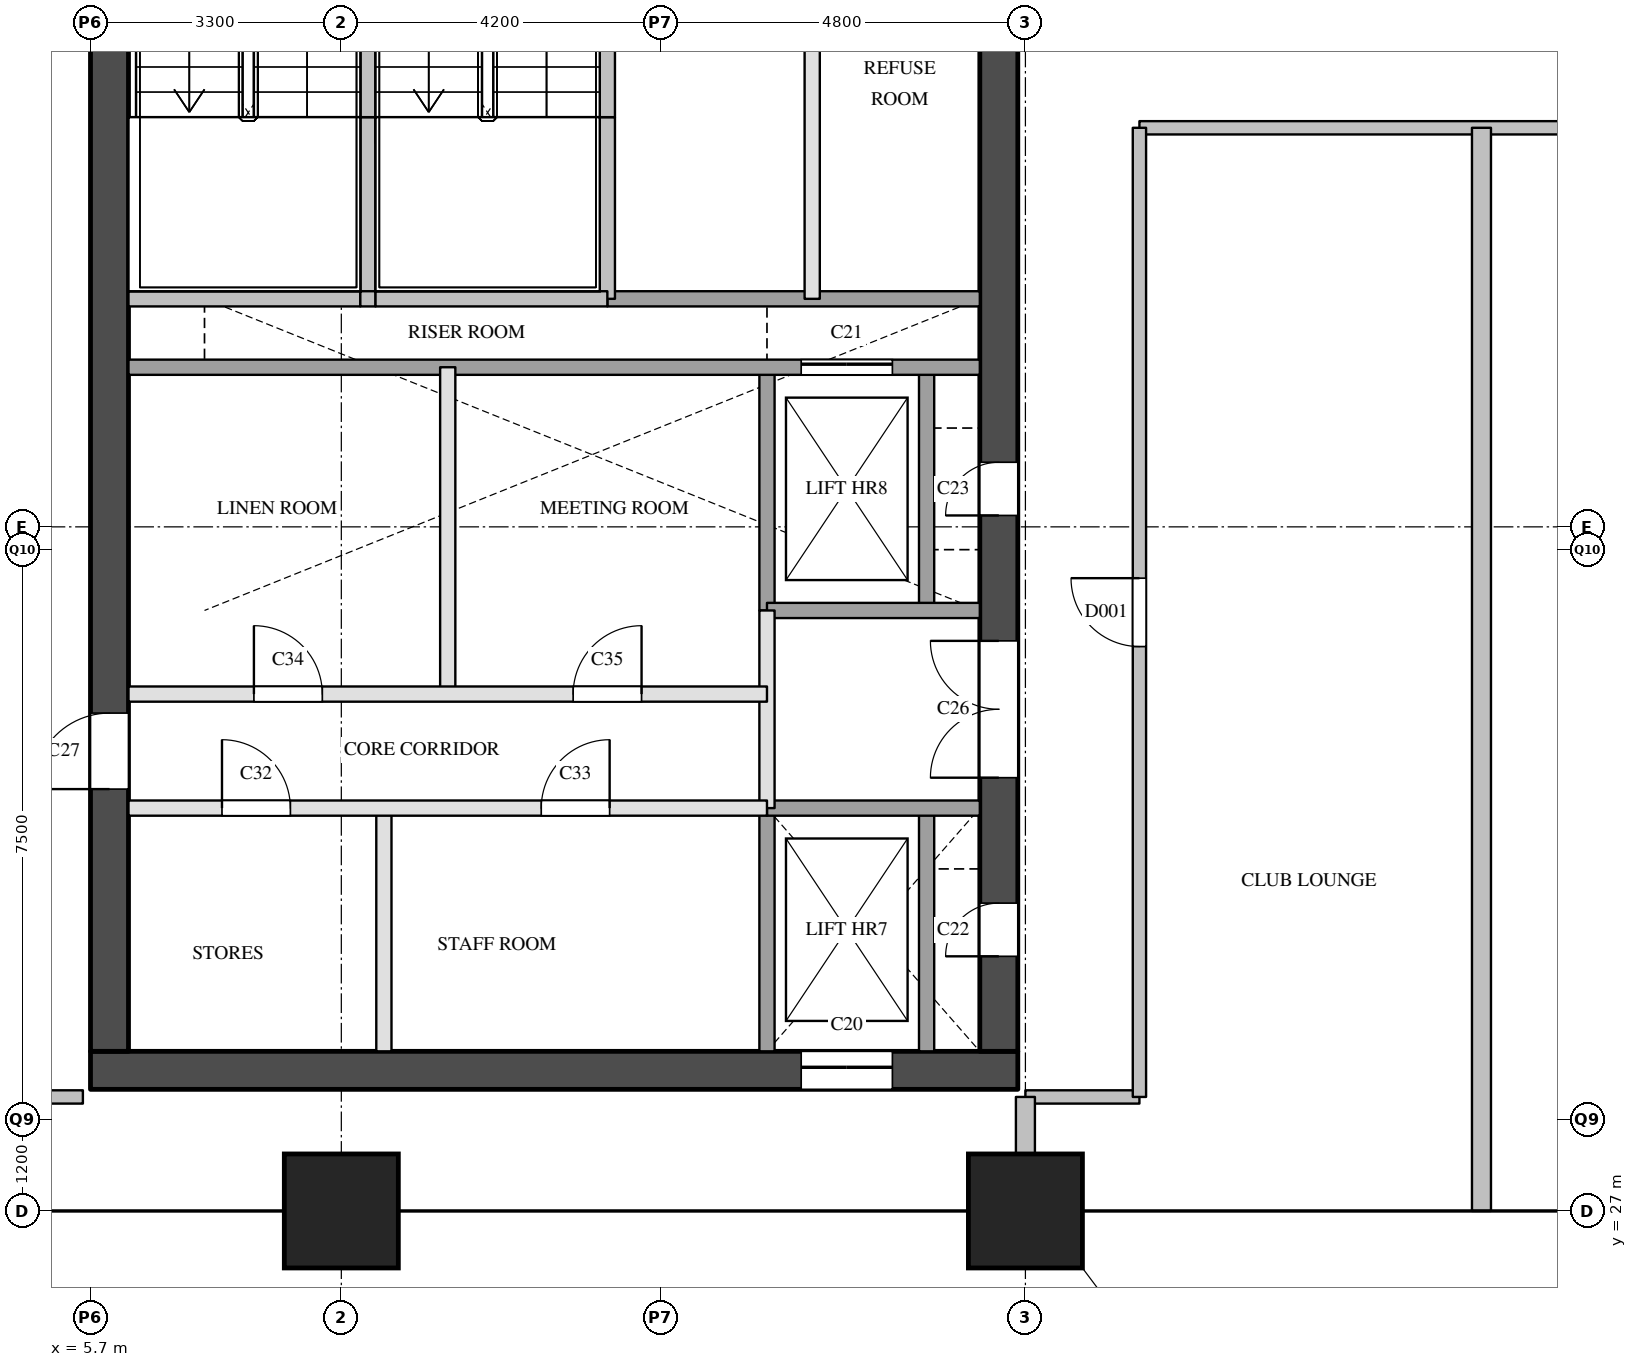
"""IFC4 building model, lengths in metres.
Left out: names, types, materials, properties, quantities, classifications, styles, units other than length and angle.
Written with IfcOpenShell. Run it as: python <this file> out.ifc"""

import sys

from ifc_helpers import new_model, si_unit, direction, frame, frame_2d, origin, origin_2d, place, context, subcontext, project, spatial, rectangle, extrude, element, fill, save


model = new_model("IFC4")
c1 = context("Model", 3, precision=1e-05, world=origin(), true_north=direction((0.0, 1.0)))
c2 = subcontext(c1, "Body", "Model", "MODEL_VIEW")
j1 = project(units=[si_unit("LENGTHUNIT", "METRE"), si_unit("PLANEANGLEUNIT", "RADIAN")], contexts=[c1])
p1 = place(None, origin())
s1 = spatial("IfcSite", under=j1, at=p1, CompositionType="ELEMENT")
p2 = place(p1, origin())
s2 = spatial("IfcBuilding", under=s1, at=p2, CompositionType="ELEMENT")
p3 = place(p2, frame((0.0, 0.0, 129.4)))
s3 = spatial("IfcBuildingStorey", under=s2, at=p3, CompositionType="ELEMENT", Elevation=129.4)
for number, where, z_axis, x_axis in (
    (1, (9.0, 27.0, 0.0), (0.0, 0.0, 1.0), (1.0, 0.0, 0.0)),
    (2, (18.0, 27.0, 0.0), (0.0, 0.0, 1.0), (1.0, 0.0, 0.0)),
):
    element("IfcColumn", number, at=place(p3, frame(where, z_axis=z_axis, x_axis=x_axis)), inside=s3, PredefinedType="COLUMN", context=c2, shape_type="SweptSolid", body=[
        extrude(rectangle(XDim=1.5, YDim=1.5, at=origin_2d()), origin(), (0.0, 0.0, 1.0), 5.5),
    ])
p4 = place(p3, frame((5.7, 28.85, 0.0), z_axis=(0.0, 0.0, 1.0), x_axis=(1.0, 0.0, 0.0)))
e3 = element("IfcWall", 3, at=p4, inside=s3, PredefinedType="SHEAR", context=c2, shape_type="SweptSolid", body=[
    extrude(rectangle(XDim=12.2, YDim=0.5, at=frame_2d((6.1, 0.0))), origin(), (0.0, 0.0, 1.0), 5.2),
])
p5 = place(p4, frame((9.35, 0.0, 0.0)))
e4 = element("IfcOpeningElement", 4, at=p5, cuts=e3, PredefinedType="OPENING", context=c2, shape_type="SweptSolid", body=[
    extrude(rectangle(XDim=1.2, YDim=2.1, at=frame_2d((0.6, 1.05))), frame((0.0, 0.26, 0.0), z_axis=(0.0, -1.0, 0.0), x_axis=(1.0, 0.0, 0.0)), (0.0, 0.0, 1.0), 0.52),
])
p6 = place(p3, frame((5.95, 29.1, 0.0), z_axis=(0.0, 0.0, 1.0), x_axis=(0.0, 1.0, 0.0)))
e5 = element("IfcWall", 5, at=p6, inside=s3, PredefinedType="SHEAR", context=c2, shape_type="SweptSolid", body=[
    extrude(rectangle(XDim=20.3, YDim=0.5, at=frame_2d((10.15, 0.0))), origin(), (0.0, 0.0, 1.0), 5.2),
])
p7 = place(p6, frame((3.45, 0.0, 0.0)))
e6 = element("IfcOpeningElement", 6, at=p7, cuts=e5, PredefinedType="OPENING", context=c2, shape_type="SweptSolid", body=[
    extrude(rectangle(XDim=1.0, YDim=2.1, at=frame_2d((0.5, 1.05))), frame((0.0, 0.26, 0.0), z_axis=(0.0, -1.0, 0.0), x_axis=(1.0, 0.0, 0.0)), (0.0, 0.0, 1.0), 0.52),
])
p8 = place(p6, frame((16.4, 0.0, 0.0)))
e7 = element("IfcOpeningElement", 7, at=p8, cuts=e5, PredefinedType="OPENING", context=c2, shape_type="SweptSolid", body=[
    extrude(rectangle(XDim=1.0, YDim=2.1, at=frame_2d((0.5, 1.05))), frame((0.0, 0.26, 0.0), z_axis=(0.0, -1.0, 0.0), x_axis=(1.0, 0.0, 0.0)), (0.0, 0.0, 1.0), 0.52),
])
p9 = place(p3, frame((17.65, 29.1, 0.0), z_axis=(0.0, 0.0, 1.0), x_axis=(0.0, 1.0, 0.0)))
e8 = element("IfcWall", 8, at=p9, inside=s3, PredefinedType="SHEAR", context=c2, shape_type="SweptSolid", body=[
    extrude(rectangle(XDim=20.3, YDim=0.5, at=frame_2d((10.15, 0.0))), origin(), (0.0, 0.0, 1.0), 5.2),
])
p10 = place(p9, frame((1.25, 0.0, 0.0)))
e9 = element("IfcOpeningElement", 9, at=p10, cuts=e8, PredefinedType="OPENING", context=c2, shape_type="SweptSolid", body=[
    extrude(rectangle(XDim=0.7, YDim=2.1, at=frame_2d((0.35, 1.05))), frame((0.0, 0.26, 0.0), z_axis=(0.0, -1.0, 0.0), x_axis=(1.0, 0.0, 0.0)), (0.0, 0.0, 1.0), 0.52),
])
p11 = place(p9, frame((7.05, 0.0, 0.0)))
e10 = element("IfcOpeningElement", 10, at=p11, cuts=e8, PredefinedType="OPENING", context=c2, shape_type="SweptSolid", body=[
    extrude(rectangle(XDim=0.7, YDim=2.1, at=frame_2d((0.35, 1.05))), frame((0.0, 0.26, 0.0), z_axis=(0.0, -1.0, 0.0), x_axis=(1.0, 0.0, 0.0)), (0.0, 0.0, 1.0), 0.52),
])
p12 = place(p9, frame((3.6, 0.0, 0.0)))
e11 = element("IfcOpeningElement", 11, at=p12, cuts=e8, PredefinedType="OPENING", context=c2, shape_type="SweptSolid", body=[
    extrude(rectangle(XDim=1.8, YDim=2.1, at=frame_2d((0.9, 1.05))), frame((0.0, 0.26, 0.0), z_axis=(0.0, -1.0, 0.0), x_axis=(1.0, 0.0, 0.0)), (0.0, 0.0, 1.0), 0.52),
])
p13 = place(p3, frame((9.35, 39.0, 0.0), z_axis=(0.0, 0.0, 1.0), x_axis=(0.0, 1.0, 0.0)))
e12 = element("IfcWall", 12, at=p13, inside=s3, PredefinedType="SOLIDWALL", context=c2, shape_type="SweptSolid", body=[
    extrude(rectangle(XDim=2.39, YDim=0.2, at=frame_2d((1.195, 0.0))), origin(), (0.0, 0.0, 1.0), 5.2),
])
p14 = place(p3, frame((9.35, 41.39, 0.0), z_axis=(0.0, 0.0, 1.0), x_axis=(0.0, 1.0, 0.0)))
e13 = element("IfcWall", 13, at=p14, inside=s3, PredefinedType="SOLIDWALL", context=c2, shape_type="SweptSolid", body=[
    extrude(rectangle(XDim=2.31, YDim=0.2, at=frame_2d((1.155, 0.0))), origin(), (0.0, 0.0, 1.0), 5.2),
])
p15 = place(p3, frame((9.56, 29.1, 0.0), z_axis=(0.0, 0.0, 1.0), x_axis=(0.0, 1.0, 0.0)))
e14 = element("IfcWall", 14, at=p15, inside=s3, PredefinedType="PARTITIONING", context=c2, shape_type="SweptSolid", body=[
    extrude(rectangle(XDim=3.2, YDim=0.2, at=frame_2d((1.6, 0.0))), origin(), (0.0, 0.0, 1.0), 5.2),
])
p16 = place(p3, frame((10.4, 33.8, 0.0), z_axis=(0.0, 0.0, 1.0), x_axis=(0.0, 1.0, 0.0)))
e15 = element("IfcWall", 15, at=p16, inside=s3, PredefinedType="PARTITIONING", context=c2, shape_type="SweptSolid", body=[
    extrude(rectangle(XDim=4.3, YDim=0.2, at=frame_2d((2.15, 0.0))), origin(), (0.0, 0.0, 1.0), 5.2),
])
p17 = place(p3, frame((12.5, 39.0, 0.0), z_axis=(0.0, 0.0, 1.0), x_axis=(0.0, 1.0, 0.0)))
e16 = element("IfcWall", 16, at=p17, inside=s3, PredefinedType="SOLIDWALL", context=c2, shape_type="SweptSolid", body=[
    extrude(rectangle(XDim=2.39, YDim=0.2, at=frame_2d((1.195, 0.0))), origin(), (0.0, 0.0, 1.0), 5.2),
])
p18 = place(p3, frame((12.5, 41.39, 0.0), z_axis=(0.0, 0.0, 1.0), x_axis=(0.0, 1.0, 0.0)))
e17 = element("IfcWall", 17, at=p18, inside=s3, PredefinedType="SOLIDWALL", context=c2, shape_type="SweptSolid", body=[
    extrude(rectangle(XDim=2.31, YDim=0.2, at=frame_2d((1.155, 0.0))), origin(), (0.0, 0.0, 1.0), 5.2),
])
p19 = place(p3, frame((14.6, 32.3, 0.0), z_axis=(0.0, 0.0, 1.0), x_axis=(0.0, 1.0, 0.0)))
e18 = element("IfcWall", 18, at=p19, inside=s3, PredefinedType="PARTITIONING", context=c2, shape_type="SweptSolid", body=[
    extrude(rectangle(XDim=2.6, YDim=0.2, at=frame_2d((1.3, 0.0))), origin(), (0.0, 0.0, 1.0), 5.2),
])
p20 = place(p3, frame((14.6, 29.1, 0.0), z_axis=(0.0, 0.0, 1.0), x_axis=(0.0, 1.0, 0.0)))
e19 = element("IfcWall", 19, at=p20, inside=s3, PredefinedType="SOLIDWALL", context=c2, shape_type="SweptSolid", body=[
    extrude(rectangle(XDim=3.2, YDim=0.2, at=frame_2d((1.6, 0.0))), origin(), (0.0, 0.0, 1.0), 5.2),
])
p21 = place(p3, frame((14.6, 34.9, 0.0), z_axis=(0.0, 0.0, 1.0), x_axis=(0.0, 1.0, 0.0)))
e20 = element("IfcWall", 20, at=p21, inside=s3, PredefinedType="SOLIDWALL", context=c2, shape_type="SweptSolid", body=[
    extrude(rectangle(XDim=3.2, YDim=0.2, at=frame_2d((1.6, 0.0))), origin(), (0.0, 0.0, 1.0), 5.2),
])
p22 = place(p3, frame((15.195, 39.0, 0.0), z_axis=(0.0, 0.0, 1.0), x_axis=(0.0, 1.0, 0.0)))
e21 = element("IfcWall", 21, at=p22, inside=s3, PredefinedType="PARTITIONING", context=c2, shape_type="SweptSolid", body=[
    extrude(rectangle(XDim=6.2, YDim=0.2, at=frame_2d((3.1, 0.0))), origin(), (0.0, 0.0, 1.0), 5.2),
])
p23 = place(p3, frame((16.7, 29.1, 0.0), z_axis=(0.0, 0.0, 1.0), x_axis=(0.0, 1.0, 0.0)))
e22 = element("IfcWall", 22, at=p23, inside=s3, PredefinedType="SOLIDWALL", context=c2, shape_type="SweptSolid", body=[
    extrude(rectangle(XDim=3.2, YDim=0.2, at=frame_2d((1.6, 0.0))), origin(), (0.0, 0.0, 1.0), 5.2),
])
p24 = place(p3, frame((16.7, 34.9, 0.0), z_axis=(0.0, 0.0, 1.0), x_axis=(0.0, 1.0, 0.0)))
e23 = element("IfcWall", 23, at=p24, inside=s3, PredefinedType="SOLIDWALL", context=c2, shape_type="SweptSolid", body=[
    extrude(rectangle(XDim=3.2, YDim=0.2, at=frame_2d((1.6, 0.0))), origin(), (0.0, 0.0, 1.0), 5.2),
])
p25 = place(p3, frame((6.2, 32.3, 0.0), z_axis=(0.0, 0.0, 1.0), x_axis=(1.0, 0.0, 0.0)))
e24 = element("IfcWall", 24, at=p25, inside=s3, PredefinedType="PARTITIONING", context=c2, shape_type="SweptSolid", body=[
    extrude(rectangle(XDim=8.4, YDim=0.2, at=frame_2d((4.2, 0.0))), origin(), (0.0, 0.0, 1.0), 5.2),
])
p26 = place(p25, frame((1.23, 0.0, 0.0)))
e25 = element("IfcOpeningElement", 25, at=p26, cuts=e24, PredefinedType="OPENING", context=c2, shape_type="SweptSolid", body=[
    extrude(rectangle(XDim=0.9, YDim=2.1, at=frame_2d((0.45, 1.05))), frame((0.0, 0.11, 0.0), z_axis=(0.0, -1.0, 0.0), x_axis=(1.0, 0.0, 0.0)), (0.0, 0.0, 1.0), 0.22),
])
p27 = place(p25, frame((5.43, 0.0, 0.0)))
e26 = element("IfcOpeningElement", 26, at=p27, cuts=e24, PredefinedType="OPENING", context=c2, shape_type="SweptSolid", body=[
    extrude(rectangle(XDim=0.9, YDim=2.1, at=frame_2d((0.45, 1.05))), frame((0.0, 0.11, 0.0), z_axis=(0.0, -1.0, 0.0), x_axis=(1.0, 0.0, 0.0)), (0.0, 0.0, 1.0), 0.22),
])
p28 = place(p3, frame((14.6, 32.3, 0.0), z_axis=(0.0, 0.0, 1.0), x_axis=(1.0, 0.0, 0.0)))
e27 = element("IfcWall", 27, at=p28, inside=s3, PredefinedType="SOLIDWALL", context=c2, shape_type="SweptSolid", body=[
    extrude(rectangle(XDim=2.8, YDim=0.2, at=frame_2d((1.4, 0.0))), origin(), (0.0, 0.0, 1.0), 5.2),
])
p29 = place(p3, frame((6.2, 33.8, 0.0), z_axis=(0.0, 0.0, 1.0), x_axis=(1.0, 0.0, 0.0)))
e28 = element("IfcWall", 28, at=p29, inside=s3, PredefinedType="PARTITIONING", context=c2, shape_type="SweptSolid", body=[
    extrude(rectangle(XDim=8.4, YDim=0.2, at=frame_2d((4.2, 0.0))), origin(), (0.0, 0.0, 1.0), 5.2),
])
p30 = place(p29, frame((1.65, 0.0, 0.0)))
e29 = element("IfcOpeningElement", 29, at=p30, cuts=e28, PredefinedType="OPENING", context=c2, shape_type="SweptSolid", body=[
    extrude(rectangle(XDim=0.9, YDim=2.1, at=frame_2d((0.45, 1.05))), frame((0.0, 0.11, 0.0), z_axis=(0.0, -1.0, 0.0), x_axis=(1.0, 0.0, 0.0)), (0.0, 0.0, 1.0), 0.22),
])
p31 = place(p29, frame((5.85, 0.0, 0.0)))
e30 = element("IfcOpeningElement", 30, at=p31, cuts=e28, PredefinedType="OPENING", context=c2, shape_type="SweptSolid", body=[
    extrude(rectangle(XDim=0.9, YDim=2.1, at=frame_2d((0.45, 1.05))), frame((0.0, 0.11, 0.0), z_axis=(0.0, -1.0, 0.0), x_axis=(1.0, 0.0, 0.0)), (0.0, 0.0, 1.0), 0.22),
])
p32 = place(p3, frame((14.6, 34.9, 0.0), z_axis=(0.0, 0.0, 1.0), x_axis=(1.0, 0.0, 0.0)))
e31 = element("IfcWall", 31, at=p32, inside=s3, PredefinedType="SOLIDWALL", context=c2, shape_type="SweptSolid", body=[
    extrude(rectangle(XDim=2.8, YDim=0.2, at=frame_2d((1.4, 0.0))), origin(), (0.0, 0.0, 1.0), 5.2),
])
p33 = place(p3, frame((6.2, 38.1, 0.0), z_axis=(0.0, 0.0, 1.0), x_axis=(1.0, 0.0, 0.0)))
e32 = element("IfcWall", 32, at=p33, inside=s3, PredefinedType="SOLIDWALL", context=c2, shape_type="SweptSolid", body=[
    extrude(rectangle(XDim=11.2, YDim=0.2, at=frame_2d((5.6, 0.0))), origin(), (0.0, 0.0, 1.0), 5.2),
])
p34 = place(p33, frame((8.85, 0.0, 0.0)))
e33 = element("IfcOpeningElement", 33, at=p34, cuts=e32, PredefinedType="OPENING", context=c2, shape_type="SweptSolid", body=[
    extrude(rectangle(XDim=1.2, YDim=2.1, at=frame_2d((0.6, 1.05))), frame((0.0, 0.11, 0.0), z_axis=(0.0, -1.0, 0.0), x_axis=(1.0, 0.0, 0.0)), (0.0, 0.0, 1.0), 0.22),
])
p35 = place(p3, frame((12.5, 39.0, 0.0), z_axis=(0.0, 0.0, 1.0), x_axis=(1.0, 0.0, 0.0)))
e34 = element("IfcWall", 34, at=p35, inside=s3, PredefinedType="SOLIDWALL", context=c2, shape_type="SweptSolid", body=[
    extrude(rectangle(XDim=4.9, YDim=0.2, at=frame_2d((2.45, 0.0))), origin(), (0.0, 0.0, 1.0), 5.2),
])
p36 = place(p3, frame((6.2, 39.0, 0.0), z_axis=(0.0, 0.0, 1.0), x_axis=(1.0, 0.0, 0.0)))
e35 = element("IfcWall", 35, at=p36, inside=s3, PredefinedType="SOLIDWALL", context=c2, shape_type="SweptSolid", body=[
    extrude(rectangle(XDim=3.05, YDim=0.2, at=frame_2d((1.525, 0.0))), origin(), (0.0, 0.0, 1.0), 5.2),
])
p37 = place(p3, frame((9.25, 39.0, 0.0), z_axis=(0.0, 0.0, 1.0), x_axis=(1.0, 0.0, 0.0)))
e36 = element("IfcWall", 36, at=p37, inside=s3, PredefinedType="SOLIDWALL", context=c2, shape_type="SweptSolid", body=[
    extrude(rectangle(XDim=0.2, YDim=0.2, at=frame_2d((0.1, 0.0))), origin(), (0.0, 0.0, 1.0), 5.2),
])
p38 = place(p3, frame((9.45, 39.0, 0.0), z_axis=(0.0, 0.0, 1.0), x_axis=(1.0, 0.0, 0.0)))
e37 = element("IfcWall", 37, at=p38, inside=s3, PredefinedType="SOLIDWALL", context=c2, shape_type="SweptSolid", body=[
    extrude(rectangle(XDim=3.05, YDim=0.2, at=frame_2d((1.525, 0.0))), origin(), (0.0, 0.0, 1.0), 5.2),
])
for number, where, z_axis, x_axis in (
    (38, (4.1, 28.5, 0.0), (0.0, 0.0, 1.0), (1.0, 0.0, 0.0)),
    (39, (18.0, 28.5, 0.0), (0.0, 0.0, 1.0), (1.0, 0.0, 0.0)),
):
    element("IfcWall", number, at=place(p3, frame(where, z_axis=z_axis, x_axis=x_axis)), inside=s3, PredefinedType="PARTITIONING", context=c2, shape_type="SweptSolid", body=[
        extrude(rectangle(XDim=1.5, YDim=0.175, at=frame_2d((0.75, 0.0))), origin(), (0.0, 0.0, 1.0), 5.2),
    ])
p39 = place(p3, frame((19.5, 41.25, 0.0), z_axis=(0.0, 0.0, 1.0), x_axis=(1.0, 0.0, 0.0)))
e40 = element("IfcWall", 40, at=p39, inside=s3, PredefinedType="PARTITIONING", context=c2, shape_type="SweptSolid", body=[
    extrude(rectangle(XDim=15.0, YDim=0.175, at=frame_2d((7.5, 0.0))), origin(), (0.0, 0.0, 1.0), 4.2),
])
p40 = place(p3, frame((19.5, 28.5, 0.0), z_axis=(0.0, 0.0, 1.0), x_axis=(0.0, 1.0, 0.0)))
e41 = element("IfcWall", 41, at=p40, inside=s3, PredefinedType="PARTITIONING", context=c2, shape_type="SweptSolid", body=[
    extrude(rectangle(XDim=12.75, YDim=0.175, at=frame_2d((6.375, 0.0))), origin(), (0.0, 0.0, 1.0), 5.2),
])
p41 = place(p40, frame((5.925, 0.0, 0.0)))
e42 = element("IfcOpeningElement", 42, at=p41, cuts=e41, PredefinedType="OPENING", context=c2, shape_type="SweptSolid", body=[
    extrude(rectangle(XDim=0.9, YDim=2.1, at=frame_2d((0.45, 1.05))), frame((0.0, 0.097, 0.0), z_axis=(0.0, -1.0, 0.0), x_axis=(1.0, 0.0, 0.0)), (0.0, 0.0, 1.0), 0.195),
])
p42 = place(p3, frame((18.0, 27.0, 0.0), z_axis=(0.0, 0.0, 1.0), x_axis=(0.0, 1.0, 0.0)))
e43 = element("IfcWall", 43, at=p42, inside=s3, PredefinedType="PARTITIONING", context=c2, shape_type="SweptSolid", body=[
    extrude(rectangle(XDim=1.5, YDim=0.25, at=frame_2d((0.75, 0.0))), origin(), (0.0, 0.0, 1.0), 5.2),
])
p43 = place(p3, frame((24.0, 27.0, 0.0), z_axis=(0.0, 0.0, 1.0), x_axis=(0.0, 1.0, 0.0)))
e44 = element("IfcWall", 44, at=p43, inside=s3, PredefinedType="PARTITIONING", context=c2, shape_type="SweptSolid", body=[
    extrude(rectangle(XDim=14.25, YDim=0.25, at=frame_2d((7.125, 0.0))), origin(), (0.0, 0.0, 1.0), 4.2),
])
p44 = place(p5, origin())
e45 = element("IfcDoor", 45, at=p44, inside=s3, OperationType="SLIDING_TO_LEFT", PredefinedType="DOOR", context=c2, shape_type="SweptSolid", body=[
    extrude(rectangle(XDim=1.2, YDim=2.1, at=frame_2d((0.6, 1.05))), frame((0.0, 0.025, 0.0), z_axis=(0.0, -1.0, 0.0), x_axis=(1.0, 0.0, 0.0)), (0.0, 0.0, 1.0), 0.05),
])
fill(e4, e45)
p45 = place(p34, origin())
e46 = element("IfcDoor", 46, at=p45, inside=s3, OperationType="SLIDING_TO_LEFT", PredefinedType="DOOR", context=c2, shape_type="SweptSolid", body=[
    extrude(rectangle(XDim=1.2, YDim=2.1, at=frame_2d((0.6, 1.05))), frame((0.0, 0.025, 0.0), z_axis=(0.0, -1.0, 0.0), x_axis=(1.0, 0.0, 0.0)), (0.0, 0.0, 1.0), 0.05),
])
fill(e33, e46)
p46 = place(p10, origin())
e47 = element("IfcDoor", 47, at=p46, inside=s3, OperationType="SINGLE_SWING_LEFT", PredefinedType="DOOR", context=c2, shape_type="SweptSolid", body=[
    extrude(rectangle(XDim=0.7, YDim=2.1, at=frame_2d((0.35, 1.05))), frame((0.0, 0.025, 0.0), z_axis=(0.0, -1.0, 0.0), x_axis=(1.0, 0.0, 0.0)), (0.0, 0.0, 1.0), 0.05),
])
fill(e9, e47)
p47 = place(p11, origin())
e48 = element("IfcDoor", 48, at=p47, inside=s3, OperationType="SINGLE_SWING_LEFT", PredefinedType="DOOR", context=c2, shape_type="SweptSolid", body=[
    extrude(rectangle(XDim=0.7, YDim=2.1, at=frame_2d((0.35, 1.05))), frame((0.0, 0.025, 0.0), z_axis=(0.0, -1.0, 0.0), x_axis=(1.0, 0.0, 0.0)), (0.0, 0.0, 1.0), 0.05),
])
fill(e10, e48)
p48 = place(p12, origin())
e49 = element("IfcDoor", 49, at=p48, inside=s3, OperationType="DOUBLE_DOOR_SINGLE_SWING", PredefinedType="DOOR", context=c2, shape_type="SweptSolid", body=[
    extrude(rectangle(XDim=1.8, YDim=2.1, at=frame_2d((0.9, 1.05))), frame((0.0, 0.025, 0.0), z_axis=(0.0, -1.0, 0.0), x_axis=(1.0, 0.0, 0.0)), (0.0, 0.0, 1.0), 0.05),
])
fill(e11, e49)
p49 = place(p7, origin())
e50 = element("IfcDoor", 50, at=p49, inside=s3, OperationType="SINGLE_SWING_LEFT", PredefinedType="DOOR", context=c2, shape_type="SweptSolid", body=[
    extrude(rectangle(XDim=1.0, YDim=2.1, at=frame_2d((0.5, 1.05))), frame((0.0, 0.025, 0.0), z_axis=(0.0, -1.0, 0.0), x_axis=(1.0, 0.0, 0.0)), (0.0, 0.0, 1.0), 0.05),
])
fill(e6, e50)
p50 = place(p26, origin())
e51 = element("IfcDoor", 51, at=p50, inside=s3, OperationType="SINGLE_SWING_LEFT", PredefinedType="DOOR", context=c2, shape_type="SweptSolid", body=[
    extrude(rectangle(XDim=0.9, YDim=2.1, at=frame_2d((0.45, 1.05))), frame((0.0, 0.025, 0.0), z_axis=(0.0, -1.0, 0.0), x_axis=(1.0, 0.0, 0.0)), (0.0, 0.0, 1.0), 0.05),
])
fill(e25, e51)
p51 = place(p27, origin())
e52 = element("IfcDoor", 52, at=p51, inside=s3, OperationType="SINGLE_SWING_RIGHT", PredefinedType="DOOR", context=c2, shape_type="SweptSolid", body=[
    extrude(rectangle(XDim=0.9, YDim=2.1, at=frame_2d((0.45, 1.05))), frame((0.0, 0.025, 0.0), z_axis=(0.0, -1.0, 0.0), x_axis=(1.0, 0.0, 0.0)), (0.0, 0.0, 1.0), 0.05),
])
fill(e26, e52)
p52 = place(p30, origin())
e53 = element("IfcDoor", 53, at=p52, inside=s3, OperationType="SINGLE_SWING_LEFT", PredefinedType="DOOR", context=c2, shape_type="SweptSolid", body=[
    extrude(rectangle(XDim=0.9, YDim=2.1, at=frame_2d((0.45, 1.05))), frame((0.0, 0.025, 0.0), z_axis=(0.0, -1.0, 0.0), x_axis=(1.0, 0.0, 0.0)), (0.0, 0.0, 1.0), 0.05),
])
fill(e29, e53)
p53 = place(p31, origin())
e54 = element("IfcDoor", 54, at=p53, inside=s3, OperationType="SINGLE_SWING_RIGHT", PredefinedType="DOOR", context=c2, shape_type="SweptSolid", body=[
    extrude(rectangle(XDim=0.9, YDim=2.1, at=frame_2d((0.45, 1.05))), frame((0.0, 0.025, 0.0), z_axis=(0.0, -1.0, 0.0), x_axis=(1.0, 0.0, 0.0)), (0.0, 0.0, 1.0), 0.05),
])
fill(e30, e54)
p54 = place(p41, origin())
e55 = element("IfcDoor", 55, at=p54, inside=s3, OperationType="SINGLE_SWING_RIGHT", PredefinedType="DOOR", context=c2, shape_type="SweptSolid", body=[
    extrude(rectangle(XDim=0.9, YDim=2.1, at=frame_2d((0.45, 1.05))), frame((0.0, 0.025, 0.0), z_axis=(0.0, -1.0, 0.0), x_axis=(1.0, 0.0, 0.0)), (0.0, 0.0, 1.0), 0.05),
])
fill(e42, e55)
save(model, sys.argv[1])
